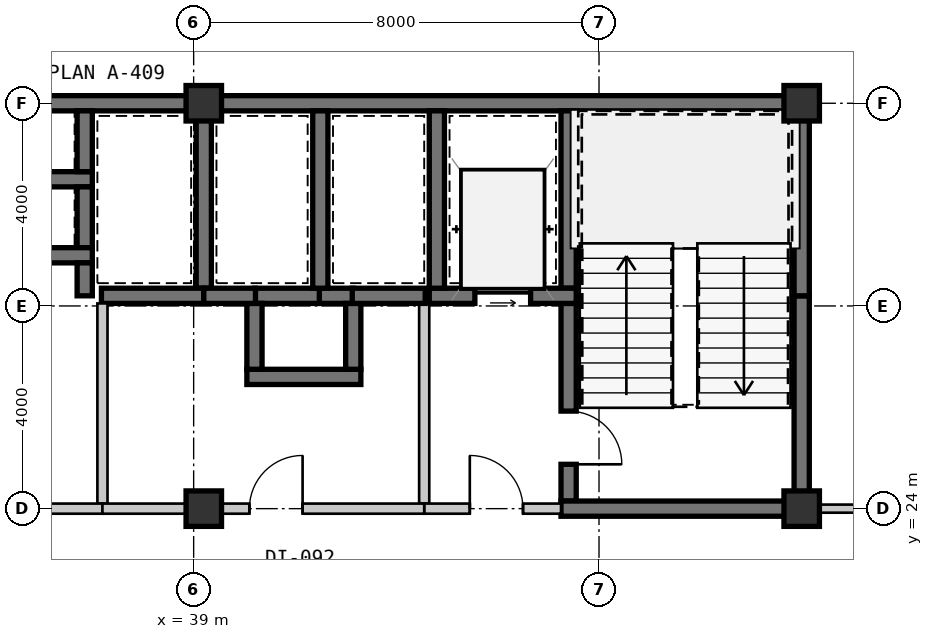
"""IFC4 building model, lengths in metres.
Left out: names, types, materials, properties, quantities, classifications, styles, units other than length and angle.
Written with IfcOpenShell. Run it as: python <this file> out.ifc"""

import sys

from ifc_helpers import new_model, si_unit, direction, frame, frame_2d, origin, origin_2d, place, context, subcontext, project, spatial, rectangle, extrude, source, transform, mapped, element, fill, save


model = new_model("IFC4")
c1 = context("Model", 3, precision=1e-05, world=origin(), true_north=direction((0.0, 1.0)))
c2 = subcontext(c1, "Body", "Model", "MODEL_VIEW")
j1 = project(units=[si_unit("LENGTHUNIT", "METRE"), si_unit("PLANEANGLEUNIT", "RADIAN")], contexts=[c1])
p1 = place(None, origin())
s1 = spatial("IfcSite", under=j1, at=p1, CompositionType="ELEMENT")
p2 = place(p1, origin())
s2 = spatial("IfcBuilding", under=s1, at=p2, CompositionType="ELEMENT")
p3 = place(p2, frame((0.0, 0.0, 87.15)))
s3 = spatial("IfcBuildingStorey", under=s2, at=p3, CompositionType="ELEMENT", Elevation=87.15)
m1 = source(origin(), c2, "Body", "SweptSolid", [
    extrude(rectangle(XDim=0.7, YDim=0.7, at=origin_2d()), origin(), (0.0, 0.0, 1.0), 3.15),
])
for number, where, z_axis, x_axis in (
    (1, (39.2, 24.0, 0.0), (0.0, 0.0, 1.0), (1.0, 0.0, 0.0)),
    (2, (51.0, 24.0, 0.0), (0.0, 0.0, 1.0), (1.0, 0.0, 0.0)),
    (3, (39.2, 32.0, 0.0), (0.0, 0.0, 1.0), (1.0, 0.0, 0.0)),
    (4, (51.0, 32.0, 0.0), (0.0, 0.0, 1.0), (1.0, 0.0, 0.0)),
):
    element("IfcColumn", number, at=place(p3, frame(where, z_axis=z_axis, x_axis=x_axis)), inside=s3, PredefinedType="COLUMN", context=c2, shape_type="MappedRepresentation", body=[
        mapped(m1, transform((0.0, 0.0, 0.0), scale=1.0)),
    ])
m2 = source(origin(), c2, "Body", "SweptSolid", [
    extrude(rectangle(XDim=11.2, YDim=0.3, at=frame_2d((5.6, 0.0))), origin(), (0.0, 0.0, 1.0), 2.93),
])
p4 = place(p3, frame((28.0, 32.0, 0.0), z_axis=(0.0, 0.0, 1.0), x_axis=(1.0, 0.0, 0.0)))
e5 = element("IfcWall", 5, at=p4, inside=s3, PredefinedType="SHEAR", context=c2, shape_type="MappedRepresentation", body=[
    mapped(m2, transform((0.0, 0.0, 0.0), scale=1.0)),
])
m3 = source(origin(), c2, "Body", "SweptSolid", [
    extrude(rectangle(XDim=11.95, YDim=0.3, at=frame_2d((5.975, 0.0))), origin(), (0.0, 0.0, 1.0), 2.93),
])
p5 = place(p3, frame((39.2, 32.0, 0.0), z_axis=(0.0, 0.0, 1.0), x_axis=(1.0, 0.0, 0.0)))
e6 = element("IfcWall", 6, at=p5, inside=s3, PredefinedType="SHEAR", context=c2, shape_type="MappedRepresentation", body=[
    mapped(m3, transform((0.0, 0.0, 0.0), scale=1.0)),
])
m4 = source(origin(), c2, "Body", "SweptSolid", [
    extrude(rectangle(XDim=4.05, YDim=0.3, at=frame_2d((2.025, 0.0))), origin(), (0.0, 0.0, 1.0), 2.93),
])
p6 = place(p3, frame((51.0, 24.15, 0.0), z_axis=(0.0, 0.0, 1.0), x_axis=(0.0, 1.0, 0.0)))
e7 = element("IfcWall", 7, at=p6, inside=s3, PredefinedType="SHEAR", context=c2, shape_type="MappedRepresentation", body=[
    mapped(m4, transform((0.0, 0.0, 0.0), scale=1.0)),
])
m5 = source(origin(), c2, "Body", "SweptSolid", [
    extrude(rectangle(XDim=3.65, YDim=0.3, at=frame_2d((1.825, 0.0))), origin(), (0.0, 0.0, 1.0), 2.93),
])
p7 = place(p3, frame((51.0, 28.2, 0.0), z_axis=(0.0, 0.0, 1.0), x_axis=(0.0, 1.0, 0.0)))
e8 = element("IfcWall", 8, at=p7, inside=s3, PredefinedType="SHEAR", context=c2, shape_type="MappedRepresentation", body=[
    mapped(m5, transform((0.0, 0.0, 0.0), scale=1.0)),
])
m6 = source(origin(), c2, "Body", "SweptSolid", [
    extrude(rectangle(XDim=3.5, YDim=0.3, at=frame_2d((1.75, 0.0))), origin(), (0.0, 0.0, 1.0), 2.93),
])
p8 = place(p3, frame((46.4, 31.85, 0.0), z_axis=(0.0, 0.0, 1.0), x_axis=(0.0, -1.0, 0.0)))
e9 = element("IfcWall", 9, at=p8, inside=s3, PredefinedType="SHEAR", context=c2, shape_type="MappedRepresentation", body=[
    mapped(m6, transform((0.0, 0.0, 0.0), scale=1.0)),
])
m7 = source(origin(), c2, "Body", "SweptSolid", [
    extrude(rectangle(XDim=3.9, YDim=0.3, at=frame_2d((1.95, 0.0))), origin(), (0.0, 0.0, 1.0), 2.93),
])
p9 = place(p3, frame((46.4, 28.05, 0.0), z_axis=(0.0, 0.0, 1.0), x_axis=(0.0, -1.0, 0.0)))
e10 = element("IfcWall", 10, at=p9, inside=s3, PredefinedType="SHEAR", context=c2, shape_type="MappedRepresentation", body=[
    mapped(m7, transform((0.0, 0.0, 0.0), scale=1.0)),
])
m8 = source(origin(), c2, "Body", "SweptSolid", [
    extrude(rectangle(XDim=1.05, YDim=2.1, at=frame_2d((0.525, 1.05))), frame((0.0, 0.16, 0.0), z_axis=(0.0, -1.0, 0.0), x_axis=(1.0, 0.0, 0.0)), (0.0, 0.0, 1.0), 0.32),
])
p10 = place(p9, frame((2.125, 0.0, 0.0)))
e11 = element("IfcOpeningElement", 11, at=p10, cuts=e10, PredefinedType="OPENING", context=c2, shape_type="MappedRepresentation", body=[
    mapped(m8, transform((0.0, 0.0, 0.0), scale=1.0)),
])
m9 = source(origin(), c2, "Body", "SweptSolid", [
    extrude(rectangle(XDim=4.9, YDim=0.3, at=frame_2d((2.45, 0.0))), origin(), (0.0, 0.0, 1.0), 2.93),
])
p11 = place(p3, frame((46.25, 24.0, 0.0), z_axis=(0.0, 0.0, 1.0), x_axis=(1.0, 0.0, 0.0)))
e12 = element("IfcWall", 12, at=p11, inside=s3, PredefinedType="SHEAR", context=c2, shape_type="MappedRepresentation", body=[
    mapped(m9, transform((0.0, 0.0, 0.0), scale=1.0)),
])
m10 = source(origin(), c2, "Body", "SweptSolid", [
    extrude(rectangle(XDim=2.9, YDim=0.3, at=frame_2d((1.45, 0.0))), origin(), (0.0, 0.0, 1.0), 2.93),
])
p12 = place(p3, frame((43.65, 28.2, 0.0), z_axis=(0.0, 0.0, 1.0), x_axis=(1.0, 0.0, 0.0)))
e13 = element("IfcWall", 13, at=p12, inside=s3, PredefinedType="SHEAR", context=c2, shape_type="MappedRepresentation", body=[
    mapped(m10, transform((0.0, 0.0, 0.0), scale=1.0)),
])
m11 = source(origin(), c2, "Body", "SweptSolid", [
    extrude(rectangle(XDim=1.1, YDim=2.15, at=frame_2d((0.55, 1.075))), frame((0.0, 0.16, 0.0), z_axis=(0.0, -1.0, 0.0), x_axis=(1.0, 0.0, 0.0)), (0.0, 0.0, 1.0), 0.32),
])
p13 = place(p12, frame((0.9, 0.0, 0.0)))
e14 = element("IfcOpeningElement", 14, at=p13, cuts=e13, PredefinedType="OPENING", context=c2, shape_type="MappedRepresentation", body=[
    mapped(m11, transform((0.0, 0.0, 0.0), scale=1.0)),
])
p14 = place(p3, frame((43.8, 31.85, 0.0), z_axis=(0.0, 0.0, 1.0), x_axis=(0.0, -1.0, 0.0)))
e15 = element("IfcWall", 15, at=p14, inside=s3, PredefinedType="SHEAR", context=c2, shape_type="MappedRepresentation", body=[
    mapped(m6, transform((0.0, 0.0, 0.0), scale=1.0)),
])
m12 = source(origin(), c2, "Body", "SweptSolid", [
    extrude(rectangle(XDim=3.95, YDim=0.2, at=frame_2d((1.975, 0.0))), origin(), (0.0, 0.0, 1.0), 2.93),
])
p15 = place(p3, frame((43.55, 28.05, 0.0), z_axis=(0.0, 0.0, 1.0), x_axis=(0.0, -1.0, 0.0)))
e16 = element("IfcWall", 16, at=p15, inside=s3, PredefinedType="SOLIDWALL", context=c2, shape_type="MappedRepresentation", body=[
    mapped(m12, transform((0.0, 0.0, 0.0), scale=1.0)),
])
m13 = source(origin(), c2, "Body", "SweptSolid", [
    extrude(rectangle(XDim=2.7, YDim=0.2, at=frame_2d((1.35, 0.0))), origin(), (0.0, 0.0, 1.0), 2.397),
])
p16 = place(p3, frame((43.55, 24.0, 0.0), z_axis=(0.0, 0.0, 1.0), x_axis=(1.0, 0.0, 0.0)))
e17 = element("IfcWall", 17, at=p16, inside=s3, PredefinedType="SOLIDWALL", context=c2, shape_type="MappedRepresentation", body=[
    mapped(m13, transform((0.0, 0.0, 0.0), scale=1.0)),
])
m14 = source(origin(), c2, "Body", "SweptSolid", [
    extrude(rectangle(XDim=1.05, YDim=2.1, at=frame_2d((0.525, 1.05))), frame((0.0, 0.11, 0.0), z_axis=(0.0, -1.0, 0.0), x_axis=(1.0, 0.0, 0.0)), (0.0, 0.0, 1.0), 0.22),
])
p17 = place(p16, frame((0.9, 0.0, 0.0)))
e18 = element("IfcOpeningElement", 18, at=p17, cuts=e17, PredefinedType="OPENING", context=c2, shape_type="MappedRepresentation", body=[
    mapped(m14, transform((0.0, 0.0, 0.0), scale=1.0)),
])
m15 = source(origin(), c2, "Body", "SweptSolid", [
    extrude(rectangle(XDim=2.0, YDim=0.3, at=frame_2d((1.0, 0.0))), origin(), (0.0, 0.0, 1.0), 2.93),
])
p18 = place(p3, frame((35.0, 30.5, 0.0), z_axis=(0.0, 0.0, 1.0), x_axis=(1.0, 0.0, 0.0)))
e19 = element("IfcWall", 19, at=p18, inside=s3, PredefinedType="SHEAR", context=c2, shape_type="MappedRepresentation", body=[
    mapped(m15, transform((0.0, 0.0, 0.0), scale=1.0)),
])
m16 = source(origin(), c2, "Body", "SweptSolid", [
    extrude(rectangle(XDim=1.2, YDim=0.3, at=frame_2d((0.6, 0.0))), origin(), (0.0, 0.0, 1.0), 2.93),
])
for number, where, z_axis, x_axis in (
    (20, (36.85, 30.65, 0.0), (0.0, 0.0, 1.0), (0.0, 1.0, 0.0)),
    (21, (36.85, 29.15, 0.0), (0.0, 0.0, 1.0), (0.0, 1.0, 0.0)),
):
    element("IfcWall", number, at=place(p3, frame(where, z_axis=z_axis, x_axis=x_axis)), inside=s3, PredefinedType="SHEAR", context=c2, shape_type="MappedRepresentation", body=[
        mapped(m16, transform((0.0, 0.0, 0.0), scale=1.0)),
    ])
p19 = place(p3, frame((35.0, 29.0, 0.0), z_axis=(0.0, 0.0, 1.0), x_axis=(1.0, 0.0, 0.0)))
e22 = element("IfcWall", 22, at=p19, inside=s3, PredefinedType="SHEAR", context=c2, shape_type="MappedRepresentation", body=[
    mapped(m15, transform((0.0, 0.0, 0.0), scale=1.0)),
])
m17 = source(origin(), c2, "Body", "SweptSolid", [
    extrude(rectangle(XDim=1.32, YDim=0.3, at=frame_2d((0.66, 0.0))), origin(), (0.0, 0.0, 1.0), 2.93),
])
p20 = place(p3, frame((41.52, 28.2, 0.0), z_axis=(0.0, 0.0, 1.0), x_axis=(-1.0, 0.0, 0.0)))
e23 = element("IfcWall", 23, at=p20, inside=s3, PredefinedType="SHEAR", context=c2, shape_type="MappedRepresentation", body=[
    mapped(m17, transform((0.0, 0.0, 0.0), scale=1.0)),
])
m18 = source(origin(), c2, "Body", "SweptSolid", [
    extrude(rectangle(XDim=0.67, YDim=0.3, at=frame_2d((0.335, 0.0))), origin(), (0.0, 0.0, 1.0), 2.93),
])
p21 = place(p3, frame((42.15, 28.2, 0.0), z_axis=(0.0, 0.0, 1.0), x_axis=(-1.0, 0.0, 0.0)))
e24 = element("IfcWall", 24, at=p21, inside=s3, PredefinedType="SHEAR", context=c2, shape_type="MappedRepresentation", body=[
    mapped(m18, transform((0.0, 0.0, 0.0), scale=1.0)),
])
m19 = source(origin(), c2, "Body", "SweptSolid", [
    extrude(rectangle(XDim=2.25, YDim=0.3, at=frame_2d((1.125, 0.0))), origin(), (0.0, 0.0, 1.0), 2.93),
])
p22 = place(p3, frame((40.05, 26.6, 0.0), z_axis=(0.0, 0.0, 1.0), x_axis=(1.0, 0.0, 0.0)))
e25 = element("IfcWall", 25, at=p22, inside=s3, PredefinedType="SHEAR", context=c2, shape_type="MappedRepresentation", body=[
    mapped(m19, transform((0.0, 0.0, 0.0), scale=1.0)),
])
m20 = source(origin(), c2, "Body", "SweptSolid", [
    extrude(rectangle(XDim=1.3, YDim=0.3, at=frame_2d((0.65, 0.0))), origin(), (0.0, 0.0, 1.0), 2.93),
])
for number, where, z_axis, x_axis in (
    (26, (40.2, 28.05, 0.0), (0.0, 0.0, 1.0), (0.0, -1.0, 0.0)),
    (27, (42.15, 26.75, 0.0), (0.0, 0.0, 1.0), (0.0, 1.0, 0.0)),
):
    element("IfcWall", number, at=place(p3, frame(where, z_axis=z_axis, x_axis=x_axis)), inside=s3, PredefinedType="SHEAR", context=c2, shape_type="MappedRepresentation", body=[
        mapped(m20, transform((0.0, 0.0, 0.0), scale=1.0)),
    ])
p23 = place(p3, frame((39.2, 28.35, 0.0), z_axis=(0.0, 0.0, 1.0), x_axis=(0.0, 1.0, 0.0)))
e28 = element("IfcWall", 28, at=p23, inside=s3, PredefinedType="SHEAR", context=c2, shape_type="MappedRepresentation", body=[
    mapped(m6, transform((0.0, 0.0, 0.0), scale=1.0)),
])
m21 = source(origin(), c2, "Body", "SweptSolid", [
    extrude(rectangle(XDim=0.65, YDim=0.3, at=frame_2d((0.325, 0.0))), origin(), (0.0, 0.0, 1.0), 2.93),
])
p24 = place(p3, frame((36.85, 28.85, 0.0), z_axis=(0.0, 0.0, 1.0), x_axis=(0.0, -1.0, 0.0)))
e29 = element("IfcWall", 29, at=p24, inside=s3, PredefinedType="SHEAR", context=c2, shape_type="MappedRepresentation", body=[
    mapped(m21, transform((0.0, 0.0, 0.0), scale=1.0)),
])
m22 = source(origin(), c2, "Body", "SweptSolid", [
    extrude(rectangle(XDim=2.02, YDim=0.3, at=frame_2d((1.01, 0.0))), origin(), (0.0, 0.0, 1.0), 2.93),
])
p25 = place(p3, frame((37.18, 28.2, 0.0), z_axis=(0.0, 0.0, 1.0), x_axis=(1.0, 0.0, 0.0)))
e30 = element("IfcWall", 30, at=p25, inside=s3, PredefinedType="SHEAR", context=c2, shape_type="MappedRepresentation", body=[
    mapped(m22, transform((0.0, 0.0, 0.0), scale=1.0)),
])
p26 = place(p3, frame((41.5, 28.35, 0.0), z_axis=(0.0, 0.0, 1.0), x_axis=(0.0, 1.0, 0.0)))
e31 = element("IfcWall", 31, at=p26, inside=s3, PredefinedType="SHEAR", context=c2, shape_type="MappedRepresentation", body=[
    mapped(m6, transform((0.0, 0.0, 0.0), scale=1.0)),
])
m23 = source(origin(), c2, "Body", "SweptSolid", [
    extrude(rectangle(XDim=1.02, YDim=0.3, at=frame_2d((0.51, 0.0))), origin(), (0.0, 0.0, 1.0), 2.93),
])
p27 = place(p3, frame((39.2, 28.2, 0.0), z_axis=(0.0, 0.0, 1.0), x_axis=(1.0, 0.0, 0.0)))
e32 = element("IfcWall", 32, at=p27, inside=s3, PredefinedType="SHEAR", context=c2, shape_type="MappedRepresentation", body=[
    mapped(m23, transform((0.0, 0.0, 0.0), scale=1.0)),
])
m24 = source(origin(), c2, "Body", "SweptSolid", [
    extrude(rectangle(XDim=1.44, YDim=0.3, at=frame_2d((0.72, 0.0))), origin(), (0.0, 0.0, 1.0), 2.93),
])
p28 = place(p3, frame((42.13, 28.2, 0.0), z_axis=(0.0, 0.0, 1.0), x_axis=(1.0, 0.0, 0.0)))
e33 = element("IfcWall", 33, at=p28, inside=s3, PredefinedType="SHEAR", context=c2, shape_type="MappedRepresentation", body=[
    mapped(m24, transform((0.0, 0.0, 0.0), scale=1.0)),
])
p29 = place(p3, frame((37.2, 28.05, 0.0), z_axis=(0.0, 0.0, 1.0), x_axis=(0.0, -1.0, 0.0)))
e34 = element("IfcWall", 34, at=p29, inside=s3, PredefinedType="SOLIDWALL", context=c2, shape_type="MappedRepresentation", body=[
    mapped(m12, transform((0.0, 0.0, 0.0), scale=1.0)),
])
m25 = source(origin(), c2, "Body", "SweptSolid", [
    extrude(rectangle(XDim=6.4, YDim=0.2, at=frame_2d((3.2, 0.0))), origin(), (0.0, 0.0, 1.0), 2.47),
])
p30 = place(p3, frame((37.2, 24.0, 0.0), z_axis=(0.0, 0.0, 1.0), x_axis=(-1.0, 0.0, 0.0)))
e35 = element("IfcWall", 35, at=p30, inside=s3, PredefinedType="SOLIDWALL", context=c2, shape_type="MappedRepresentation", body=[
    mapped(m25, transform((0.0, 0.0, 0.0), scale=1.0)),
])
p31 = place(p30, frame((2.675, 0.0, 0.0)))
e36 = element("IfcOpeningElement", 36, at=p31, cuts=e35, PredefinedType="OPENING", context=c2, shape_type="MappedRepresentation", body=[
    mapped(m14, transform((0.0, 0.0, 0.0), scale=1.0)),
])
m26 = source(origin(), c2, "Body", "SweptSolid", [
    extrude(rectangle(XDim=4.35, YDim=0.2, at=frame_2d((2.175, 0.0))), origin(), (0.0, 0.0, 1.0), 2.397),
])
p32 = place(p3, frame((43.55, 24.0, 0.0), z_axis=(0.0, 0.0, 1.0), x_axis=(-1.0, 0.0, 0.0)))
e37 = element("IfcWall", 37, at=p32, inside=s3, PredefinedType="SOLIDWALL", context=c2, shape_type="MappedRepresentation", body=[
    mapped(m26, transform((0.0, 0.0, 0.0), scale=1.0)),
])
p33 = place(p32, frame((2.4, 0.0, 0.0)))
e38 = element("IfcOpeningElement", 38, at=p33, cuts=e37, PredefinedType="OPENING", context=c2, shape_type="MappedRepresentation", body=[
    mapped(m14, transform((0.0, 0.0, 0.0), scale=1.0)),
])
m27 = source(origin(), c2, "Body", "SweptSolid", [
    extrude(rectangle(XDim=2.0, YDim=0.2, at=frame_2d((1.0, 0.0))), origin(), (0.0, 0.0, 1.0), 2.47),
])
p34 = place(p3, frame((39.2, 24.0, 0.0), z_axis=(0.0, 0.0, 1.0), x_axis=(-1.0, 0.0, 0.0)))
e39 = element("IfcWall", 39, at=p34, inside=s3, PredefinedType="SOLIDWALL", context=c2, shape_type="MappedRepresentation", body=[
    mapped(m27, transform((0.0, 0.0, 0.0), scale=1.0)),
])
m28 = source(origin(), c2, "Body", "SweptSolid", [
    extrude(rectangle(XDim=1.155, YDim=0.16, at=frame_2d((0.577, 0.0))), origin(), (0.0, 0.0, 1.0), 2.328),
])
p35 = place(p3, frame((51.15, 24.0, 0.0), z_axis=(0.0, 0.0, 1.0), x_axis=(1.0, 0.0, 0.0)))
e40 = element("IfcWall", 40, at=p35, inside=s3, PredefinedType="PARTITIONING", context=c2, shape_type="MappedRepresentation", body=[
    mapped(m28, transform((0.0, 0.0, 0.0), scale=1.0)),
])
m29 = source(origin(), c2, "Body", "SweptSolid", [
    extrude(rectangle(XDim=1.05, YDim=2.1, at=frame_2d((0.525, 1.05))), frame((0.0, 0.025, 0.0), z_axis=(0.0, -1.0, 0.0), x_axis=(1.0, 0.0, 0.0)), (0.0, 0.0, 1.0), 0.05),
])
p36 = place(p10, origin())
e41 = element("IfcDoor", 41, at=p36, inside=s3, OperationType="SINGLE_SWING_RIGHT", PredefinedType="DOOR", context=c2, shape_type="MappedRepresentation", body=[
    mapped(m29, transform((0.0, 0.0, 0.0), scale=1.0)),
])
fill(e11, e41)
m30 = source(origin(), c2, "Body", "SweptSolid", [
    extrude(rectangle(XDim=1.1, YDim=2.15, at=frame_2d((0.55, 1.075))), frame((0.0, 0.025, 0.0), z_axis=(0.0, -1.0, 0.0), x_axis=(1.0, 0.0, 0.0)), (0.0, 0.0, 1.0), 0.05),
])
p37 = place(p13, origin())
e42 = element("IfcDoor", 42, at=p37, inside=s3, OperationType="SLIDING_TO_LEFT", PredefinedType="DOOR", context=c2, shape_type="MappedRepresentation", body=[
    mapped(m30, transform((0.0, 0.0, 0.0), scale=1.0)),
])
fill(e14, e42)
p38 = place(p17, origin())
e43 = element("IfcDoor", 43, at=p38, inside=s3, OperationType="SINGLE_SWING_LEFT", PredefinedType="DOOR", context=c2, shape_type="MappedRepresentation", body=[
    mapped(m29, transform((0.0, 0.0, 0.0), scale=1.0)),
])
fill(e18, e43)
p39 = place(p33, frame((1.05, 0.0, 0.0), z_axis=(0.0, 0.0, 1.0), x_axis=(-1.0, 0.0, 0.0)))
e44 = element("IfcDoor", 44, at=p39, inside=s3, OperationType="SINGLE_SWING_RIGHT", PredefinedType="DOOR", context=c2, shape_type="MappedRepresentation", body=[
    mapped(m29, transform((0.0, 0.0, 0.0), scale=1.0)),
])
fill(e38, e44)
save(model, sys.argv[1])
